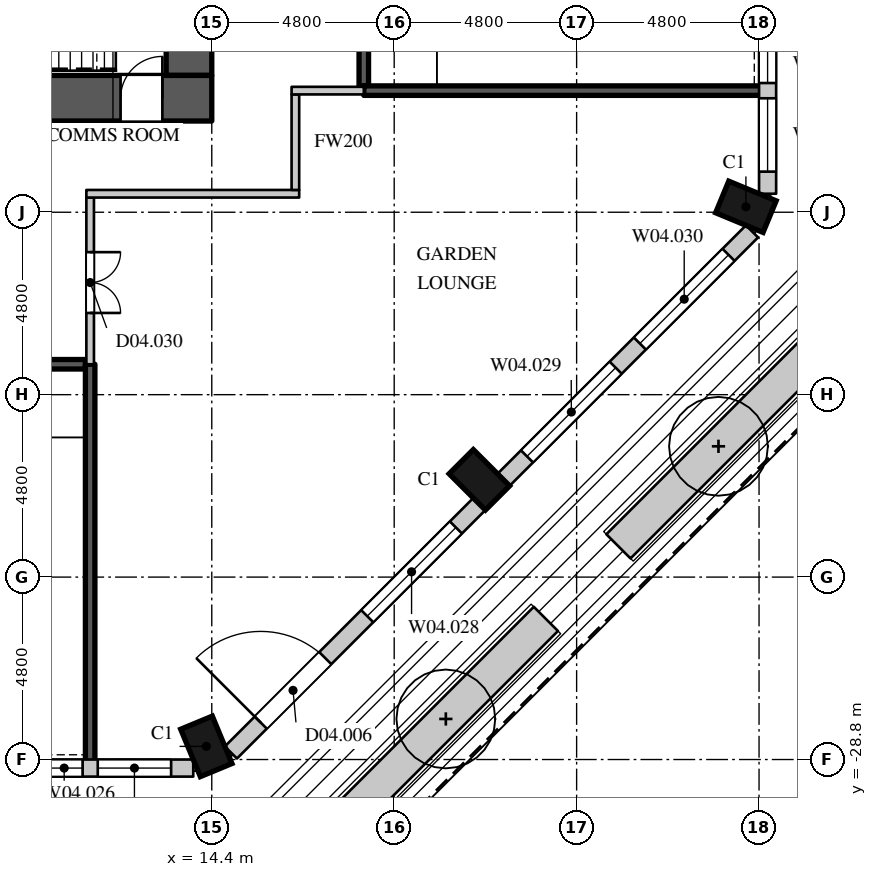
"""IFC4 building model, lengths in metres.
Left out: names, types, materials, properties, quantities, classifications, styles, units other than length and angle.
Written with IfcOpenShell. Run it as: python <this file> out.ifc"""

import sys

from ifc_helpers import new_model, si_unit, direction, frame, frame_2d, origin, origin_2d, place, context, subcontext, project, spatial, rectangle, extrude, element, fill, save


model = new_model("IFC4")
c1 = context("Model", 3, precision=1e-05, world=origin(), true_north=direction((0.0, 1.0)))
c2 = subcontext(c1, "Body", "Model", "MODEL_VIEW")
j1 = project(units=[si_unit("LENGTHUNIT", "METRE"), si_unit("PLANEANGLEUNIT", "RADIAN")], contexts=[c1])
p1 = place(None, origin())
s1 = spatial("IfcSite", under=j1, at=p1, CompositionType="ELEMENT")
p2 = place(p1, origin())
s2 = spatial("IfcBuilding", under=s1, at=p2, CompositionType="ELEMENT")
p3 = place(p2, frame((0.0, 0.0, 21.0)))
s3 = spatial("IfcBuildingStorey", under=s2, at=p3, CompositionType="ELEMENT", Elevation=21.0)
for number, where, z_axis, x_axis in (
    (1, (28.454, -14.257, 0.0), (0.0, 0.0, 1.0), (0.383, 0.924, 0.0)),
    (2, (14.257, -28.454, 0.0), (0.0, 0.0, 1.0), (0.924, 0.383, 0.0)),
    (3, (21.441, -21.441, 0.0), (0.0, 0.0, 1.0), (0.707, 0.707, 0.0)),
):
    element("IfcColumn", number, at=place(p3, frame(where, z_axis=z_axis, x_axis=x_axis)), inside=s3, PredefinedType="COLUMN", context=c2, shape_type="SweptSolid", body=[
        extrude(rectangle(XDim=0.9, YDim=1.35, at=origin_2d()), origin(), (0.0, 0.0, 1.0), 4.5),
    ])
p4 = place(p3, frame((29.025, -13.913, 0.9), z_axis=(0.0, 0.0, 1.0), x_axis=(0.0, 1.0, 0.0)))
e4 = element("IfcWall", 4, at=p4, inside=s3, PredefinedType="ELEMENTEDWALL", context=c2, shape_type="SweptSolid", body=[
    extrude(rectangle(XDim=8.663, YDim=0.45, at=frame_2d((4.332, 0.0))), origin(), (0.0, 0.0, 1.0), 3.3),
])
p5 = place(p4, frame((0.582, 0.0, 0.15)))
e5 = element("IfcOpeningElement", 5, at=p5, cuts=e4, PredefinedType="OPENING", context=c2, shape_type="SweptSolid", body=[
    extrude(rectangle(XDim=1.93, YDim=2.7, at=frame_2d((0.965, 1.35))), frame((0.0, 0.235, 0.0), z_axis=(0.0, -1.0, 0.0), x_axis=(1.0, 0.0, 0.0)), (0.0, 0.0, 1.0), 0.47),
])
p6 = place(p4, frame((2.913, 0.0, 0.15)))
e6 = element("IfcOpeningElement", 6, at=p6, cuts=e4, PredefinedType="OPENING", context=c2, shape_type="SweptSolid", body=[
    extrude(rectangle(XDim=0.97, YDim=2.7, at=frame_2d((0.485, 1.35))), frame((0.0, 0.235, 0.0), z_axis=(0.0, -1.0, 0.0), x_axis=(1.0, 0.0, 0.0)), (0.0, 0.0, 1.0), 0.47),
])
p7 = place(p4, frame((4.781, 0.0, 0.15)))
e7 = element("IfcOpeningElement", 7, at=p7, cuts=e4, PredefinedType="OPENING", context=c2, shape_type="SweptSolid", body=[
    extrude(rectangle(XDim=2.13, YDim=2.7, at=frame_2d((1.065, 1.35))), frame((0.0, 0.235, 0.0), z_axis=(0.0, -1.0, 0.0), x_axis=(1.0, 0.0, 0.0)), (0.0, 0.0, 1.0), 0.47),
])
p8 = place(p3, frame((5.25, -29.025, 0.9), z_axis=(0.0, 0.0, 1.0), x_axis=(1.0, 0.0, 0.0)))
e8 = element("IfcWall", 8, at=p8, inside=s3, PredefinedType="ELEMENTEDWALL", context=c2, shape_type="SweptSolid", body=[
    extrude(rectangle(XDim=8.663, YDim=0.45, at=frame_2d((4.332, 0.0))), origin(), (0.0, 0.0, 1.0), 3.3),
])
p9 = place(p8, frame((1.75, 0.0, 0.15)))
e9 = element("IfcOpeningElement", 9, at=p9, cuts=e8, PredefinedType="OPENING", context=c2, shape_type="SweptSolid", body=[
    extrude(rectangle(XDim=2.13, YDim=2.7, at=frame_2d((1.065, 1.35))), frame((0.0, 0.235, 0.0), z_axis=(0.0, -1.0, 0.0), x_axis=(1.0, 0.0, 0.0)), (0.0, 0.0, 1.0), 0.47),
])
p10 = place(p8, frame((4.781, 0.0, 0.15)))
e10 = element("IfcOpeningElement", 10, at=p10, cuts=e8, PredefinedType="OPENING", context=c2, shape_type="SweptSolid", body=[
    extrude(rectangle(XDim=0.97, YDim=2.7, at=frame_2d((0.485, 1.35))), frame((0.0, 0.235, 0.0), z_axis=(0.0, -1.0, 0.0), x_axis=(1.0, 0.0, 0.0)), (0.0, 0.0, 1.0), 0.47),
])
p11 = place(p8, frame((6.15, 0.0, 0.15)))
e11 = element("IfcOpeningElement", 11, at=p11, cuts=e8, PredefinedType="OPENING", context=c2, shape_type="SweptSolid", body=[
    extrude(rectangle(XDim=1.93, YDim=2.7, at=frame_2d((0.965, 1.35))), frame((0.0, 0.235, 0.0), z_axis=(0.0, -1.0, 0.0), x_axis=(1.0, 0.0, 0.0)), (0.0, 0.0, 1.0), 0.47),
])
p12 = place(p3, frame((14.904, -28.615, 0.0), z_axis=(0.0, 0.0, 1.0), x_axis=(0.707106781187, 0.707106781187, 0.0)))
e12 = element("IfcWall", 12, at=p12, inside=s3, PredefinedType="ELEMENTEDWALL", context=c2, shape_type="SweptSolid", body=[
    extrude(rectangle(XDim=9.245, YDim=0.45, at=frame_2d((4.623, 0.0))), origin(), (0.0, 0.0, 1.0), 4.2),
])
p13 = place(p12, frame((1.111, 0.0, 0.0)))
e13 = element("IfcOpeningElement", 13, at=p13, cuts=e12, PredefinedType="OPENING", context=c2, shape_type="SweptSolid", body=[
    extrude(rectangle(XDim=2.4, YDim=2.7, at=frame_2d((1.2, 1.35))), frame((0.0, 0.235, 0.0), z_axis=(0.0, -1.0, 0.0), x_axis=(1.0, 0.0, 0.0)), (0.0, 0.0, 1.0), 0.47),
])
p14 = place(p12, frame((5.073, 0.0, 1.05)))
e14 = element("IfcOpeningElement", 14, at=p14, cuts=e12, PredefinedType="OPENING", context=c2, shape_type="SweptSolid", body=[
    extrude(rectangle(XDim=3.3, YDim=2.7, at=frame_2d((1.65, 1.35))), frame((0.0, 0.235, 0.0), z_axis=(0.0, -1.0, 0.0), x_axis=(1.0, 0.0, 0.0)), (0.0, 0.0, 1.0), 0.47),
])
p15 = place(p3, frame((22.077, -21.441, 0.9), z_axis=(0.0, 0.0, 1.0), x_axis=(0.707106781187, 0.707106781187, 0.0)))
e15 = element("IfcWall", 15, at=p15, inside=s3, PredefinedType="ELEMENTEDWALL", context=c2, shape_type="SweptSolid", body=[
    extrude(rectangle(XDim=9.245, YDim=0.45, at=frame_2d((4.623, 0.0))), origin(), (0.0, 0.0, 1.0), 3.3),
])
p16 = place(p15, frame((0.873, 0.0, 0.15)))
e16 = element("IfcOpeningElement", 16, at=p16, cuts=e15, PredefinedType="OPENING", context=c2, shape_type="SweptSolid", body=[
    extrude(rectangle(XDim=3.3, YDim=2.7, at=frame_2d((1.65, 1.35))), frame((0.0, 0.235, 0.0), z_axis=(0.0, -1.0, 0.0), x_axis=(1.0, 0.0, 0.0)), (0.0, 0.0, 1.0), 0.47),
])
p17 = place(p15, frame((5.073, 0.0, 0.15)))
e17 = element("IfcOpeningElement", 17, at=p17, cuts=e15, PredefinedType="OPENING", context=c2, shape_type="SweptSolid", body=[
    extrude(rectangle(XDim=3.3, YDim=2.7, at=frame_2d((1.65, 1.35))), frame((0.0, 0.235, 0.0), z_axis=(0.0, -1.0, 0.0), x_axis=(1.0, 0.0, 0.0)), (0.0, 0.0, 1.0), 0.47),
])
for number, where, z_axis, x_axis in (
    (18, (17.927, -30.365, 0.0), (0.0, 0.0, 1.0), (0.707, 0.707, 0.0)),
    (19, (25.1, -23.191, 0.0), (0.0, 0.0, 1.0), (0.707, 0.707, 0.0)),
):
    element("IfcWall", number, at=place(p3, frame(where, z_axis=z_axis, x_axis=x_axis)), inside=s3, PredefinedType="USERDEFINED", context=c2, shape_type="SweptSolid", body=[
        extrude(rectangle(XDim=7.445, YDim=0.9, at=frame_2d((3.723, 0.0))), origin(), (0.0, 0.0, 1.0), 0.9),
    ])
p18 = place(p3, frame((-14.4, -11.4, 0.0), z_axis=(0.0, 0.0, 1.0), x_axis=(1.0, 0.0, 0.0)))
e20 = element("IfcWall", 20, at=p18, inside=s3, PredefinedType="SHEAR", context=c2, shape_type="SweptSolid", body=[
    extrude(rectangle(XDim=28.8, YDim=1.2, at=frame_2d((14.4, 0.0))), origin(), (0.0, 0.0, 1.0), 4.5),
])
p19 = place(p18, frame((1.3, 0.0, 0.0)))
e21 = element("IfcOpeningElement", 21, at=p19, cuts=e20, PredefinedType="OPENING", context=c2, shape_type="SweptSolid", body=[
    extrude(rectangle(XDim=1.1, YDim=2.2, at=frame_2d((0.55, 1.1))), frame((0.0, 0.61, 0.0), z_axis=(0.0, -1.0, 0.0), x_axis=(1.0, 0.0, 0.0)), (0.0, 0.0, 1.0), 1.22),
])
p20 = place(p18, frame((26.4, 0.0, 0.0)))
e22 = element("IfcOpeningElement", 22, at=p20, cuts=e20, PredefinedType="OPENING", context=c2, shape_type="SweptSolid", body=[
    extrude(rectangle(XDim=1.1, YDim=2.2, at=frame_2d((0.55, 1.1))), frame((0.0, 0.61, 0.0), z_axis=(0.0, -1.0, 0.0), x_axis=(1.0, 0.0, 0.0)), (0.0, 0.0, 1.0), 1.22),
])
p21 = place(p3, frame((13.8, -10.8, 0.0), z_axis=(0.0, 0.0, 1.0), x_axis=(0.0, 1.0, 0.0)))
e23 = element("IfcWall", 23, at=p21, inside=s3, PredefinedType="SHEAR", context=c2, shape_type="SweptSolid", body=[
    extrude(rectangle(XDim=21.6, YDim=1.2, at=frame_2d((10.8, 0.0))), origin(), (0.0, 0.0, 1.0), 4.5),
])
p22 = place(p21, frame((14.35, 0.0, 0.0)))
e24 = element("IfcOpeningElement", 24, at=p22, cuts=e23, PredefinedType="OPENING", context=c2, shape_type="SweptSolid", body=[
    extrude(rectangle(XDim=1.5, YDim=2.4, at=frame_2d((0.75, 1.2))), frame((0.0, 0.61, 0.0), z_axis=(0.0, -1.0, 0.0), x_axis=(1.0, 0.0, 0.0)), (0.0, 0.0, 1.0), 1.22),
])
p23 = place(p21, frame((5.75, 0.0, 0.0)))
e25 = element("IfcOpeningElement", 25, at=p23, cuts=e23, PredefinedType="OPENING", context=c2, shape_type="SweptSolid", body=[
    extrude(rectangle(XDim=1.5, YDim=2.4, at=frame_2d((0.75, 1.2))), frame((0.0, 0.61, 0.0), z_axis=(0.0, -1.0, 0.0), x_axis=(1.0, 0.0, 0.0)), (0.0, 0.0, 1.0), 1.22),
])
p24 = place(p3, frame((11.2, -18.4, 0.0), z_axis=(0.0, 0.0, 1.0), x_axis=(0.0, 1.0, 0.0)))
e26 = element("IfcWall", 26, at=p24, inside=s3, PredefinedType="PARTITIONING", context=c2, shape_type="SweptSolid", body=[
    extrude(rectangle(XDim=4.386, YDim=0.2, at=frame_2d((2.193, 0.0))), origin(), (0.0, 0.0, 1.0), 4.25),
])
p25 = place(p24, frame((1.35, 0.0, 0.0)))
e27 = element("IfcOpeningElement", 27, at=p25, cuts=e26, PredefinedType="OPENING", context=c2, shape_type="SweptSolid", body=[
    extrude(rectangle(XDim=1.6, YDim=2.4, at=frame_2d((0.8, 1.2))), frame((0.0, 0.11, 0.0), z_axis=(0.0, -1.0, 0.0), x_axis=(1.0, 0.0, 0.0)), (0.0, 0.0, 1.0), 0.22),
])
p26 = place(p3, frame((11.1, -13.914, 0.0), z_axis=(0.0, 0.0, 1.0), x_axis=(1.0, 0.0, 0.0)))
e28 = element("IfcWall", 28, at=p26, inside=s3, PredefinedType="PARTITIONING", context=c2, shape_type="SweptSolid", body=[
    extrude(rectangle(XDim=5.6, YDim=0.2, at=frame_2d((2.8, 0.0))), origin(), (0.0, 0.0, 1.0), 4.25),
])
p27 = place(p3, frame((16.6, -13.813, 0.0), z_axis=(0.0, 0.0, 1.0), x_axis=(0.0, 1.0, 0.0)))
e29 = element("IfcWall", 29, at=p27, inside=s3, PredefinedType="PARTITIONING", context=c2, shape_type="SweptSolid", body=[
    extrude(rectangle(XDim=2.513, YDim=0.2, at=frame_2d((1.257, 0.0))), origin(), (0.0, 0.0, 1.0), 4.25),
])
p28 = place(p3, frame((16.5, -11.2, 0.0), z_axis=(0.0, 0.0, 1.0), x_axis=(1.0, 0.0, 0.0)))
e30 = element("IfcWall", 30, at=p28, inside=s3, PredefinedType="PARTITIONING", context=c2, shape_type="SweptSolid", body=[
    extrude(rectangle(XDim=1.9, YDim=0.2, at=frame_2d((0.95, 0.0))), origin(), (0.0, 0.0, 1.0), 3.55),
])
p29 = place(p3, frame((6.925, -18.4, 0.0), z_axis=(0.0, 0.0, 1.0), x_axis=(1.0, 0.0, 0.0)))
e31 = element("IfcWall", 31, at=p29, inside=s3, PredefinedType="SHEAR", context=c2, shape_type="SweptSolid", body=[
    extrude(rectangle(XDim=4.15, YDim=0.25, at=frame_2d((2.075, 0.0))), origin(), (0.0, 0.0, 1.0), 4.25),
])
p30 = place(p29, frame((1.5, 0.0, 0.0)))
e32 = element("IfcOpeningElement", 32, at=p30, cuts=e31, PredefinedType="OPENING", context=c2, shape_type="SweptSolid", body=[
    extrude(rectangle(XDim=1.1, YDim=2.2, at=frame_2d((0.55, 1.1))), frame((0.0, 0.135, 0.0), z_axis=(0.0, -1.0, 0.0), x_axis=(1.0, 0.0, 0.0)), (0.0, 0.0, 1.0), 0.27),
])
p31 = place(p3, frame((11.2, -28.855, 0.0), z_axis=(0.0, 0.0, 1.0), x_axis=(0.0, 1.0, 0.0)))
e33 = element("IfcWall", 33, at=p31, inside=s3, PredefinedType="SHEAR", context=c2, shape_type="SweptSolid", body=[
    extrude(rectangle(XDim=10.455, YDim=0.25, at=frame_2d((5.228, 0.0))), origin(), (0.0, 0.0, 1.0), 4.25),
])
p32 = place(p3, frame((18.4, -11.075, 0.0), z_axis=(0.0, 0.0, 1.0), x_axis=(0.0, 1.0, 0.0)))
e34 = element("IfcWall", 34, at=p32, inside=s3, PredefinedType="SHEAR", context=c2, shape_type="SweptSolid", body=[
    extrude(rectangle(XDim=4.15, YDim=0.25, at=frame_2d((2.075, 0.0))), origin(), (0.0, 0.0, 1.0), 4.25),
])
p33 = place(p32, frame((1.5, 0.0, 0.0)))
e35 = element("IfcOpeningElement", 35, at=p33, cuts=e34, PredefinedType="OPENING", context=c2, shape_type="SweptSolid", body=[
    extrude(rectangle(XDim=1.1, YDim=2.2, at=frame_2d((0.55, 1.1))), frame((0.0, 0.135, 0.0), z_axis=(0.0, -1.0, 0.0), x_axis=(1.0, 0.0, 0.0)), (0.0, 0.0, 1.0), 0.27),
])
p34 = place(p3, frame((18.4, -11.2, 0.0), z_axis=(0.0, 0.0, 1.0), x_axis=(1.0, 0.0, 0.0)))
e36 = element("IfcWall", 36, at=p34, inside=s3, PredefinedType="SHEAR", context=c2, shape_type="SweptSolid", body=[
    extrude(rectangle(XDim=10.455, YDim=0.25, at=frame_2d((5.228, 0.0))), origin(), (0.0, 0.0, 1.0), 4.25),
])
p35 = place(p5, origin())
e37 = element("IfcWindow", 37, at=p35, inside=s3, PartitioningType="SINGLE_PANEL", PredefinedType="WINDOW", context=c2, shape_type="SweptSolid", body=[
    extrude(rectangle(XDim=1.93, YDim=2.7, at=frame_2d((0.965, 1.35))), frame((0.0, 0.135, 0.0), z_axis=(0.0, -1.0, 0.0), x_axis=(1.0, 0.0, 0.0)), (0.0, 0.0, 1.0), 0.06),
])
fill(e5, e37)
p36 = place(p6, origin())
e38 = element("IfcWindow", 38, at=p36, inside=s3, PartitioningType="SINGLE_PANEL", PredefinedType="WINDOW", context=c2, shape_type="SweptSolid", body=[
    extrude(rectangle(XDim=0.97, YDim=2.7, at=frame_2d((0.485, 1.35))), frame((0.0, 0.135, 0.0), z_axis=(0.0, -1.0, 0.0), x_axis=(1.0, 0.0, 0.0)), (0.0, 0.0, 1.0), 0.06),
])
fill(e6, e38)
p37 = place(p10, origin())
e39 = element("IfcWindow", 39, at=p37, inside=s3, PartitioningType="SINGLE_PANEL", PredefinedType="WINDOW", context=c2, shape_type="SweptSolid", body=[
    extrude(rectangle(XDim=0.97, YDim=2.7, at=frame_2d((0.485, 1.35))), frame((0.0, 0.135, 0.0), z_axis=(0.0, -1.0, 0.0), x_axis=(1.0, 0.0, 0.0)), (0.0, 0.0, 1.0), 0.06),
])
fill(e10, e39)
p38 = place(p11, origin())
e40 = element("IfcWindow", 40, at=p38, inside=s3, PartitioningType="SINGLE_PANEL", PredefinedType="WINDOW", context=c2, shape_type="SweptSolid", body=[
    extrude(rectangle(XDim=1.93, YDim=2.7, at=frame_2d((0.965, 1.35))), frame((0.0, 0.135, 0.0), z_axis=(0.0, -1.0, 0.0), x_axis=(1.0, 0.0, 0.0)), (0.0, 0.0, 1.0), 0.06),
])
fill(e11, e40)
p39 = place(p13, origin())
e41 = element("IfcDoor", 41, at=p39, inside=s3, OperationType="SINGLE_SWING_LEFT", PredefinedType="DOOR", context=c2, shape_type="SweptSolid", body=[
    extrude(rectangle(XDim=2.4, YDim=2.7, at=frame_2d((1.2, 1.35))), frame((0.0, 0.13, 0.0), z_axis=(0.0, -1.0, 0.0), x_axis=(1.0, 0.0, 0.0)), (0.0, 0.0, 1.0), 0.05),
])
fill(e13, e41)
p40 = place(p14, origin())
e42 = element("IfcWindow", 42, at=p40, inside=s3, PartitioningType="SINGLE_PANEL", PredefinedType="WINDOW", context=c2, shape_type="SweptSolid", body=[
    extrude(rectangle(XDim=3.3, YDim=2.7, at=frame_2d((1.65, 1.35))), frame((0.0, 0.135, 0.0), z_axis=(0.0, -1.0, 0.0), x_axis=(1.0, 0.0, 0.0)), (0.0, 0.0, 1.0), 0.06),
])
fill(e14, e42)
p41 = place(p16, origin())
e43 = element("IfcWindow", 43, at=p41, inside=s3, PartitioningType="SINGLE_PANEL", PredefinedType="WINDOW", context=c2, shape_type="SweptSolid", body=[
    extrude(rectangle(XDim=3.3, YDim=2.7, at=frame_2d((1.65, 1.35))), frame((0.0, 0.135, 0.0), z_axis=(0.0, -1.0, 0.0), x_axis=(1.0, 0.0, 0.0)), (0.0, 0.0, 1.0), 0.06),
])
fill(e16, e43)
p42 = place(p17, origin())
e44 = element("IfcWindow", 44, at=p42, inside=s3, PartitioningType="SINGLE_PANEL", PredefinedType="WINDOW", context=c2, shape_type="SweptSolid", body=[
    extrude(rectangle(XDim=3.3, YDim=2.7, at=frame_2d((1.65, 1.35))), frame((0.0, 0.135, 0.0), z_axis=(0.0, -1.0, 0.0), x_axis=(1.0, 0.0, 0.0)), (0.0, 0.0, 1.0), 0.06),
])
fill(e17, e44)
p43 = place(p25, origin())
e45 = element("IfcDoor", 45, at=p43, inside=s3, OperationType="DOUBLE_DOOR_SINGLE_SWING", PredefinedType="DOOR", context=c2, shape_type="SweptSolid", body=[
    extrude(rectangle(XDim=1.6, YDim=2.4, at=frame_2d((0.8, 1.2))), frame((0.0, 0.025, 0.0), z_axis=(0.0, -1.0, 0.0), x_axis=(1.0, 0.0, 0.0)), (0.0, 0.0, 1.0), 0.05),
])
fill(e27, e45)
p44 = place(p20, origin())
e46 = element("IfcDoor", 46, at=p44, inside=s3, OperationType="SINGLE_SWING_RIGHT", PredefinedType="DOOR", context=c2, shape_type="SweptSolid", body=[
    extrude(rectangle(XDim=1.1, YDim=2.2, at=frame_2d((0.55, 1.1))), frame((0.0, 0.025, 0.0), z_axis=(0.0, -1.0, 0.0), x_axis=(1.0, 0.0, 0.0)), (0.0, 0.0, 1.0), 0.05),
])
fill(e22, e46)
save(model, sys.argv[1])
